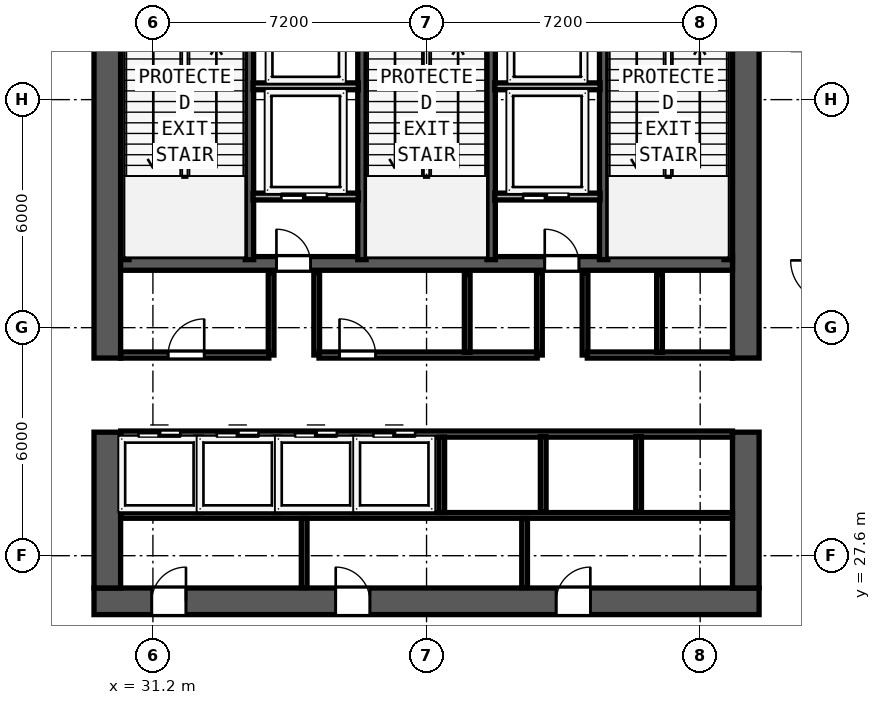
"""IFC4 building model, lengths in metres.
Left out: names, types, materials, properties, quantities, classifications, styles, units other than length and angle.
Written with IfcOpenShell. Run it as: python <this file> out.ifc"""

import sys

from ifc_helpers import new_model, si_unit, direction, frame, frame_2d, origin, place, context, subcontext, project, spatial, rectangle, extrude, element, fill, save


model = new_model("IFC4")
c1 = context("Model", 3, precision=1e-05, world=origin(), true_north=direction((0.0, 1.0)))
c2 = subcontext(c1, "Body", "Model", "MODEL_VIEW")
j1 = project(units=[si_unit("LENGTHUNIT", "METRE"), si_unit("PLANEANGLEUNIT", "RADIAN")], contexts=[c1])
p1 = place(None, origin())
s1 = spatial("IfcSite", under=j1, at=p1, CompositionType="ELEMENT")
p2 = place(p1, origin())
s2 = spatial("IfcBuilding", under=s1, at=p2, CompositionType="ELEMENT")
p3 = place(p2, frame((0.0, 0.0, 136.4)))
s3 = spatial("IfcBuildingStorey", under=s2, at=p3, CompositionType="ELEMENT", Elevation=136.4)
p4 = place(p3, frame((29.65, 26.4, 0.0), z_axis=(0.0, 0.0, 1.0), x_axis=(1.0, 0.0, 0.0)))
e1 = element("IfcWall", 1, at=p4, inside=s3, PredefinedType="SHEAR", context=c2, shape_type="SweptSolid", body=[
    extrude(rectangle(XDim=17.5, YDim=0.7, at=frame_2d((8.75, 0.0))), origin(), (0.0, 0.0, 1.0), 4.4),
])
p5 = place(p4, frame((2.42, 0.0, 0.0), z_axis=(0.0, 0.0, 1.0), x_axis=(-1.0, 0.0, 0.0)))
e2 = element("IfcOpeningElement", 2, at=p5, cuts=e1, PredefinedType="OPENING", context=c2, shape_type="SweptSolid", body=[
    extrude(rectangle(XDim=0.9, YDim=2.1, at=frame_2d((0.45, 1.05))), frame((0.0, 0.36, 0.0), z_axis=(0.0, -1.0, 0.0), x_axis=(1.0, 0.0, 0.0)), (0.0, 0.0, 1.0), 0.72),
])
p6 = place(p4, frame((7.26, 0.0, 0.0), z_axis=(0.0, 0.0, 1.0), x_axis=(-1.0, 0.0, 0.0)))
e3 = element("IfcOpeningElement", 3, at=p6, cuts=e1, PredefinedType="OPENING", context=c2, shape_type="SweptSolid", body=[
    extrude(rectangle(XDim=0.9, YDim=2.1, at=frame_2d((0.45, 1.05))), frame((0.0, 0.36, 0.0), z_axis=(0.0, -1.0, 0.0), x_axis=(1.0, 0.0, 0.0)), (0.0, 0.0, 1.0), 0.72),
])
p7 = place(p4, frame((13.06, 0.0, 0.0), z_axis=(0.0, 0.0, 1.0), x_axis=(-1.0, 0.0, 0.0)))
e4 = element("IfcOpeningElement", 4, at=p7, cuts=e1, PredefinedType="OPENING", context=c2, shape_type="SweptSolid", body=[
    extrude(rectangle(XDim=0.9, YDim=2.1, at=frame_2d((0.45, 1.05))), frame((0.0, 0.36, 0.0), z_axis=(0.0, -1.0, 0.0), x_axis=(1.0, 0.0, 0.0)), (0.0, 0.0, 1.0), 0.72),
])
p8 = place(p3, frame((30.0, 26.75, 0.0), z_axis=(0.0, 0.0, 1.0), x_axis=(0.0, 1.0, 0.0)))
e5 = element("IfcWall", 5, at=p8, inside=s3, PredefinedType="SHEAR", context=c2, shape_type="SweptSolid", body=[
    extrude(rectangle(XDim=4.1, YDim=0.7, at=frame_2d((2.05, 0.0))), origin(), (0.0, 0.0, 1.0), 4.4),
])
p9 = place(p3, frame((30.0, 32.8, 0.0), z_axis=(0.0, 0.0, 1.0), x_axis=(0.0, 1.0, 0.0)))
e6 = element("IfcWall", 6, at=p9, inside=s3, PredefinedType="SHEAR", context=c2, shape_type="SweptSolid", body=[
    extrude(rectangle(XDim=10.05, YDim=0.7, at=frame_2d((5.025, 0.0))), origin(), (0.0, 0.0, 1.0), 4.4),
])
p10 = place(p3, frame((46.8, 26.75, 0.0), z_axis=(0.0, 0.0, 1.0), x_axis=(0.0, 1.0, 0.0)))
e7 = element("IfcWall", 7, at=p10, inside=s3, PredefinedType="SHEAR", context=c2, shape_type="SweptSolid", body=[
    extrude(rectangle(XDim=4.1, YDim=0.7, at=frame_2d((2.05, 0.0))), origin(), (0.0, 0.0, 1.0), 4.4),
])
p11 = place(p3, frame((46.8, 32.8, 0.0), z_axis=(0.0, 0.0, 1.0), x_axis=(0.0, 1.0, 0.0)))
e8 = element("IfcWall", 8, at=p11, inside=s3, PredefinedType="SHEAR", context=c2, shape_type="SweptSolid", body=[
    extrude(rectangle(XDim=10.05, YDim=0.7, at=frame_2d((5.025, 0.0))), origin(), (0.0, 0.0, 1.0), 4.4),
])
p12 = place(p3, frame((30.35, 35.29, 0.0), z_axis=(0.0, 0.0, 1.0), x_axis=(1.0, 0.0, 0.0)))
e9 = element("IfcWall", 9, at=p12, inside=s3, PredefinedType="SHEAR", context=c2, shape_type="SweptSolid", body=[
    extrude(rectangle(XDim=16.1, YDim=0.36, at=frame_2d((8.05, 0.0))), origin(), (0.0, 0.0, 1.0), 4.4),
])
p13 = place(p12, frame((5.0, 0.0, 0.0), z_axis=(0.0, 0.0, 1.0), x_axis=(-1.0, 0.0, 0.0)))
e10 = element("IfcOpeningElement", 10, at=p13, cuts=e9, PredefinedType="OPENING", context=c2, shape_type="SweptSolid", body=[
    extrude(rectangle(XDim=0.9, YDim=2.1, at=frame_2d((0.45, 1.05))), frame((0.0, 0.19, 0.0), z_axis=(0.0, -1.0, 0.0), x_axis=(1.0, 0.0, 0.0)), (0.0, 0.0, 1.0), 0.38),
])
p14 = place(p12, frame((12.06, 0.0, 0.0), z_axis=(0.0, 0.0, 1.0), x_axis=(-1.0, 0.0, 0.0)))
e11 = element("IfcOpeningElement", 11, at=p14, cuts=e9, PredefinedType="OPENING", context=c2, shape_type="SweptSolid", body=[
    extrude(rectangle(XDim=0.9, YDim=2.1, at=frame_2d((0.45, 1.05))), frame((0.0, 0.19, 0.0), z_axis=(0.0, -1.0, 0.0), x_axis=(1.0, 0.0, 0.0)), (0.0, 0.0, 1.0), 0.38),
])
for number, where, z_axis, x_axis in (
    (12, (30.462, 35.39, 0.0), (0.0, 0.0, 1.0), (0.0, 1.0, 0.0)),
    (13, (33.74, 35.39, 0.0), (0.0, 0.0, 1.0), (0.0, 1.0, 0.0)),
    (14, (36.7, 35.39, 0.0), (0.0, 0.0, 1.0), (0.0, 1.0, 0.0)),
    (15, (40.1, 35.39, 0.0), (0.0, 0.0, 1.0), (0.0, 1.0, 0.0)),
    (16, (43.06, 35.39, 0.0), (0.0, 0.0, 1.0), (0.0, 1.0, 0.0)),
    (17, (46.338, 35.39, 0.0), (0.0, 0.0, 1.0), (0.0, 1.0, 0.0)),
):
    element("IfcWall", number, at=place(p3, frame(where, z_axis=z_axis, x_axis=x_axis)), inside=s3, PredefinedType="SHEAR", context=c2, shape_type="SweptSolid", body=[
        extrude(rectangle(XDim=7.46, YDim=0.22, at=frame_2d((3.73, 0.0))), origin(), (0.0, 0.0, 1.0), 4.4),
    ])
for number, where, z_axis, x_axis in (
    (18, (33.835, 39.95, 0.0), (0.0, 0.0, 1.0), (1.0, 0.0, 0.0)),
    (19, (40.195, 39.95, 0.0), (0.0, 0.0, 1.0), (1.0, 0.0, 0.0)),
):
    element("IfcWall", number, at=place(p3, frame(where, z_axis=z_axis, x_axis=x_axis)), inside=s3, PredefinedType="SOLIDWALL", context=c2, shape_type="SweptSolid", body=[
        extrude(rectangle(XDim=2.77, YDim=0.18, at=frame_2d((1.385, 0.0))), origin(), (0.0, 0.0, 1.0), 4.4),
    ])
p15 = place(p3, frame((33.835, 37.05, 0.0), z_axis=(0.0, 0.0, 1.0), x_axis=(1.0, 0.0, 0.0)))
e20 = element("IfcWall", 20, at=p15, inside=s3, PredefinedType="SOLIDWALL", context=c2, shape_type="SweptSolid", body=[
    extrude(rectangle(XDim=2.77, YDim=0.18, at=frame_2d((1.385, 0.0))), origin(), (0.0, 0.0, 1.0), 4.4),
])
p16 = place(p15, frame((1.945, 0.0, 0.0), z_axis=(0.0, 0.0, 1.0), x_axis=(-1.0, 0.0, 0.0)))
e21 = element("IfcOpeningElement", 21, at=p16, cuts=e20, PredefinedType="OPENING", context=c2, shape_type="SweptSolid", body=[
    extrude(rectangle(XDim=1.2, YDim=2.2, at=frame_2d((0.6, 1.1))), frame((0.0, 0.1, 0.0), z_axis=(0.0, -1.0, 0.0), x_axis=(1.0, 0.0, 0.0)), (0.0, 0.0, 1.0), 0.2),
])
for number, where, z_axis, x_axis in (
    (22, (34.31, 32.88, 0.0), (0.0, 0.0, 1.0), (0.0, 1.0, 0.0)),
    (23, (35.51, 32.88, 0.0), (0.0, 0.0, 1.0), (0.0, 1.0, 0.0)),
):
    element("IfcWall", number, at=place(p3, frame(where, z_axis=z_axis, x_axis=x_axis)), inside=s3, PredefinedType="SOLIDWALL", context=c2, shape_type="SweptSolid", body=[
        extrude(rectangle(XDim=2.17, YDim=0.15, at=frame_2d((1.085, 0.0))), origin(), (0.0, 0.0, 1.0), 4.4),
    ])
p17 = place(p3, frame((40.195, 37.05, 0.0), z_axis=(0.0, 0.0, 1.0), x_axis=(1.0, 0.0, 0.0)))
e24 = element("IfcWall", 24, at=p17, inside=s3, PredefinedType="SOLIDWALL", context=c2, shape_type="SweptSolid", body=[
    extrude(rectangle(XDim=2.77, YDim=0.18, at=frame_2d((1.385, 0.0))), origin(), (0.0, 0.0, 1.0), 4.4),
])
p18 = place(p17, frame((1.945, 0.0, 0.0), z_axis=(0.0, 0.0, 1.0), x_axis=(-1.0, 0.0, 0.0)))
e25 = element("IfcOpeningElement", 25, at=p18, cuts=e24, PredefinedType="OPENING", context=c2, shape_type="SweptSolid", body=[
    extrude(rectangle(XDim=1.2, YDim=2.2, at=frame_2d((0.6, 1.1))), frame((0.0, 0.1, 0.0), z_axis=(0.0, -1.0, 0.0), x_axis=(1.0, 0.0, 0.0)), (0.0, 0.0, 1.0), 0.2),
])
for number, where, z_axis, x_axis in (
    (26, (41.37, 32.88, 0.0), (0.0, 0.0, 1.0), (0.0, 1.0, 0.0)),
    (27, (42.57, 32.88, 0.0), (0.0, 0.0, 1.0), (0.0, 1.0, 0.0)),
):
    element("IfcWall", number, at=place(p3, frame(where, z_axis=z_axis, x_axis=x_axis)), inside=s3, PredefinedType="SOLIDWALL", context=c2, shape_type="SweptSolid", body=[
        extrude(rectangle(XDim=2.17, YDim=0.15, at=frame_2d((1.085, 0.0))), origin(), (0.0, 0.0, 1.0), 4.4),
    ])
p19 = place(p3, frame((30.35, 32.88, 0.0), z_axis=(0.0, 0.0, 1.0), x_axis=(1.0, 0.0, 0.0)))
e28 = element("IfcWall", 28, at=p19, inside=s3, PredefinedType="SOLIDWALL", context=c2, shape_type="SweptSolid", body=[
    extrude(rectangle(XDim=3.9, YDim=0.16, at=frame_2d((1.95, 0.0))), origin(), (0.0, 0.0, 1.0), 4.4),
])
p20 = place(p19, frame((2.2, 0.0, 0.0), z_axis=(0.0, 0.0, 1.0), x_axis=(-1.0, 0.0, 0.0)))
e29 = element("IfcOpeningElement", 29, at=p20, cuts=e28, PredefinedType="OPENING", context=c2, shape_type="SweptSolid", body=[
    extrude(rectangle(XDim=0.95, YDim=2.12, at=frame_2d((0.475, 1.06))), frame((0.0, 0.09, 0.0), z_axis=(0.0, -1.0, 0.0), x_axis=(1.0, 0.0, 0.0)), (0.0, 0.0, 1.0), 0.18),
])
p21 = place(p3, frame((35.57, 32.88, 0.0), z_axis=(0.0, 0.0, 1.0), x_axis=(1.0, 0.0, 0.0)))
e30 = element("IfcWall", 30, at=p21, inside=s3, PredefinedType="SOLIDWALL", context=c2, shape_type="SweptSolid", body=[
    extrude(rectangle(XDim=5.74, YDim=0.16, at=frame_2d((2.87, 0.0))), origin(), (0.0, 0.0, 1.0), 4.4),
])
p22 = place(p21, frame((1.49, 0.0, 0.0), z_axis=(0.0, 0.0, 1.0), x_axis=(-1.0, 0.0, 0.0)))
e31 = element("IfcOpeningElement", 31, at=p22, cuts=e30, PredefinedType="OPENING", context=c2, shape_type="SweptSolid", body=[
    extrude(rectangle(XDim=0.95, YDim=2.12, at=frame_2d((0.475, 1.06))), frame((0.0, 0.09, 0.0), z_axis=(0.0, -1.0, 0.0), x_axis=(1.0, 0.0, 0.0)), (0.0, 0.0, 1.0), 0.18),
])
p23 = place(p3, frame((42.63, 32.88, 0.0), z_axis=(0.0, 0.0, 1.0), x_axis=(1.0, 0.0, 0.0)))
e32 = element("IfcWall", 32, at=p23, inside=s3, PredefinedType="SOLIDWALL", context=c2, shape_type="SweptSolid", body=[
    extrude(rectangle(XDim=3.82, YDim=0.16, at=frame_2d((1.91, 0.0))), origin(), (0.0, 0.0, 1.0), 4.4),
])
for number, where, z_axis, x_axis in (
    (33, (39.47, 32.95, 0.0), (0.0, 0.0, 1.0), (0.0, 1.0, 0.0)),
    (34, (44.53, 32.95, 0.0), (0.0, 0.0, 1.0), (0.0, 1.0, 0.0)),
):
    element("IfcWall", number, at=place(p3, frame(where, z_axis=z_axis, x_axis=x_axis)), inside=s3, PredefinedType="SOLIDWALL", context=c2, shape_type="SweptSolid", body=[
        extrude(rectangle(XDim=2.05, YDim=0.15, at=frame_2d((1.025, 0.0))), origin(), (0.0, 0.0, 1.0), 4.4),
    ])
p24 = place(p3, frame((30.35, 30.8, 0.0), z_axis=(0.0, 0.0, 1.0), x_axis=(1.0, 0.0, 0.0)))
e35 = element("IfcWall", 35, at=p24, inside=s3, PredefinedType="SOLIDWALL", context=c2, shape_type="SweptSolid", body=[
    extrude(rectangle(XDim=16.1, YDim=0.16, at=frame_2d((8.05, 0.0))), origin(), (0.0, 0.0, 1.0), 4.4),
])
p25 = place(p24, frame((0.47, 0.0, 0.0)))
e36 = element("IfcOpeningElement", 36, at=p25, cuts=e35, PredefinedType="OPENING", context=c2, shape_type="SweptSolid", body=[
    extrude(rectangle(XDim=1.1, YDim=2.2, at=frame_2d((0.55, 1.1))), frame((0.0, 0.09, 0.0), z_axis=(0.0, -1.0, 0.0), x_axis=(1.0, 0.0, 0.0)), (0.0, 0.0, 1.0), 0.18),
])
p26 = place(p24, frame((2.53, 0.0, 0.0)))
e37 = element("IfcOpeningElement", 37, at=p26, cuts=e35, PredefinedType="OPENING", context=c2, shape_type="SweptSolid", body=[
    extrude(rectangle(XDim=1.1, YDim=2.2, at=frame_2d((0.55, 1.1))), frame((0.0, 0.09, 0.0), z_axis=(0.0, -1.0, 0.0), x_axis=(1.0, 0.0, 0.0)), (0.0, 0.0, 1.0), 0.18),
])
p27 = place(p24, frame((4.59, 0.0, 0.0)))
e38 = element("IfcOpeningElement", 38, at=p27, cuts=e35, PredefinedType="OPENING", context=c2, shape_type="SweptSolid", body=[
    extrude(rectangle(XDim=1.1, YDim=2.2, at=frame_2d((0.55, 1.1))), frame((0.0, 0.09, 0.0), z_axis=(0.0, -1.0, 0.0), x_axis=(1.0, 0.0, 0.0)), (0.0, 0.0, 1.0), 0.18),
])
p28 = place(p24, frame((6.65, 0.0, 0.0)))
e39 = element("IfcOpeningElement", 39, at=p28, cuts=e35, PredefinedType="OPENING", context=c2, shape_type="SweptSolid", body=[
    extrude(rectangle(XDim=1.1, YDim=2.2, at=frame_2d((0.55, 1.1))), frame((0.0, 0.09, 0.0), z_axis=(0.0, -1.0, 0.0), x_axis=(1.0, 0.0, 0.0)), (0.0, 0.0, 1.0), 0.18),
])
p29 = place(p3, frame((30.35, 28.66, 0.0), z_axis=(0.0, 0.0, 1.0), x_axis=(1.0, 0.0, 0.0)))
e40 = element("IfcWall", 40, at=p29, inside=s3, PredefinedType="PARTITIONING", context=c2, shape_type="SweptSolid", body=[
    extrude(rectangle(XDim=16.1, YDim=0.15, at=frame_2d((8.05, 0.0))), origin(), (0.0, 0.0, 1.0), 4.4),
])
for number, where, z_axis, x_axis in (
    (41, (32.4, 28.735, 0.0), (0.0, 0.0, 1.0), (0.0, 1.0, 0.0)),
    (42, (34.46, 28.735, 0.0), (0.0, 0.0, 1.0), (0.0, 1.0, 0.0)),
    (43, (36.52, 28.735, 0.0), (0.0, 0.0, 1.0), (0.0, 1.0, 0.0)),
    (44, (38.8, 28.735, 0.0), (0.0, 0.0, 1.0), (0.0, 1.0, 0.0)),
):
    element("IfcWall", number, at=place(p3, frame(where, z_axis=z_axis, x_axis=x_axis)), inside=s3, PredefinedType="SOLIDWALL", context=c2, shape_type="SweptSolid", body=[
        extrude(rectangle(XDim=1.985, YDim=0.15, at=frame_2d((0.992, 0.0))), origin(), (0.0, 0.0, 1.0), 4.4),
    ])
for number, where, z_axis, x_axis in (
    (45, (35.18, 26.76, 0.0), (0.0, 0.0, 1.0), (0.0, 1.0, 0.0)),
    (46, (40.98, 26.76, 0.0), (0.0, 0.0, 1.0), (0.0, 1.0, 0.0)),
):
    element("IfcWall", number, at=place(p3, frame(where, z_axis=z_axis, x_axis=x_axis)), inside=s3, PredefinedType="PARTITIONING", context=c2, shape_type="SweptSolid", body=[
        extrude(rectangle(XDim=1.82, YDim=0.15, at=frame_2d((0.91, 0.0))), origin(), (0.0, 0.0, 1.0), 4.4),
    ])
for number, where, z_axis, x_axis in (
    (47, (41.47, 28.75, 0.0), (0.0, 0.0, 1.0), (0.0, 1.0, 0.0)),
    (48, (43.98, 28.75, 0.0), (0.0, 0.0, 1.0), (0.0, 1.0, 0.0)),
):
    element("IfcWall", number, at=place(p3, frame(where, z_axis=z_axis, x_axis=x_axis)), inside=s3, PredefinedType="SOLIDWALL", context=c2, shape_type="SweptSolid", body=[
        extrude(rectangle(XDim=1.985, YDim=0.15, at=frame_2d((0.993, 0.0))), origin(), (0.0, 0.0, 1.0), 4.4),
    ])
p30 = place(p16, origin())
e49 = element("IfcDoor", 49, at=p30, inside=s3, OperationType="SLIDING_TO_RIGHT", PredefinedType="DOOR", context=c2, shape_type="SweptSolid", body=[
    extrude(rectangle(XDim=1.2, YDim=2.2, at=frame_2d((0.6, 1.1))), frame((0.0, 0.025, 0.0), z_axis=(0.0, -1.0, 0.0), x_axis=(1.0, 0.0, 0.0)), (0.0, 0.0, 1.0), 0.05),
])
fill(e21, e49)
p31 = place(p13, origin())
e50 = element("IfcDoor", 50, at=p31, inside=s3, OperationType="SINGLE_SWING_RIGHT", PredefinedType="DOOR", context=c2, shape_type="SweptSolid", body=[
    extrude(rectangle(XDim=0.9, YDim=2.1, at=frame_2d((0.45, 1.05))), frame((0.0, 0.025, 0.0), z_axis=(0.0, -1.0, 0.0), x_axis=(1.0, 0.0, 0.0)), (0.0, 0.0, 1.0), 0.05),
])
fill(e10, e50)
p32 = place(p18, origin())
e51 = element("IfcDoor", 51, at=p32, inside=s3, OperationType="SLIDING_TO_RIGHT", PredefinedType="DOOR", context=c2, shape_type="SweptSolid", body=[
    extrude(rectangle(XDim=1.2, YDim=2.2, at=frame_2d((0.6, 1.1))), frame((0.0, 0.025, 0.0), z_axis=(0.0, -1.0, 0.0), x_axis=(1.0, 0.0, 0.0)), (0.0, 0.0, 1.0), 0.05),
])
fill(e25, e51)
p33 = place(p14, origin())
e52 = element("IfcDoor", 52, at=p33, inside=s3, OperationType="SINGLE_SWING_RIGHT", PredefinedType="DOOR", context=c2, shape_type="SweptSolid", body=[
    extrude(rectangle(XDim=0.9, YDim=2.1, at=frame_2d((0.45, 1.05))), frame((0.0, 0.025, 0.0), z_axis=(0.0, -1.0, 0.0), x_axis=(1.0, 0.0, 0.0)), (0.0, 0.0, 1.0), 0.05),
])
fill(e11, e52)
p34 = place(p20, origin())
e53 = element("IfcDoor", 53, at=p34, inside=s3, OperationType="SINGLE_SWING_LEFT", PredefinedType="DOOR", context=c2, shape_type="SweptSolid", body=[
    extrude(rectangle(XDim=0.95, YDim=2.12, at=frame_2d((0.475, 1.06))), frame((0.0, 0.025, 0.0), z_axis=(0.0, -1.0, 0.0), x_axis=(1.0, 0.0, 0.0)), (0.0, 0.0, 1.0), 0.05),
])
fill(e29, e53)
p35 = place(p22, origin())
e54 = element("IfcDoor", 54, at=p35, inside=s3, OperationType="SINGLE_SWING_RIGHT", PredefinedType="DOOR", context=c2, shape_type="SweptSolid", body=[
    extrude(rectangle(XDim=0.95, YDim=2.12, at=frame_2d((0.475, 1.06))), frame((0.0, 0.025, 0.0), z_axis=(0.0, -1.0, 0.0), x_axis=(1.0, 0.0, 0.0)), (0.0, 0.0, 1.0), 0.05),
])
fill(e31, e54)
p36 = place(p25, origin())
e55 = element("IfcDoor", 55, at=p36, inside=s3, OperationType="SLIDING_TO_LEFT", PredefinedType="DOOR", context=c2, shape_type="SweptSolid", body=[
    extrude(rectangle(XDim=1.1, YDim=2.2, at=frame_2d((0.55, 1.1))), frame((0.0, 0.025, 0.0), z_axis=(0.0, -1.0, 0.0), x_axis=(1.0, 0.0, 0.0)), (0.0, 0.0, 1.0), 0.05),
])
fill(e36, e55)
p37 = place(p26, origin())
e56 = element("IfcDoor", 56, at=p37, inside=s3, OperationType="SLIDING_TO_LEFT", PredefinedType="DOOR", context=c2, shape_type="SweptSolid", body=[
    extrude(rectangle(XDim=1.1, YDim=2.2, at=frame_2d((0.55, 1.1))), frame((0.0, 0.025, 0.0), z_axis=(0.0, -1.0, 0.0), x_axis=(1.0, 0.0, 0.0)), (0.0, 0.0, 1.0), 0.05),
])
fill(e37, e56)
p38 = place(p27, origin())
e57 = element("IfcDoor", 57, at=p38, inside=s3, OperationType="SLIDING_TO_LEFT", PredefinedType="DOOR", context=c2, shape_type="SweptSolid", body=[
    extrude(rectangle(XDim=1.1, YDim=2.2, at=frame_2d((0.55, 1.1))), frame((0.0, 0.025, 0.0), z_axis=(0.0, -1.0, 0.0), x_axis=(1.0, 0.0, 0.0)), (0.0, 0.0, 1.0), 0.05),
])
fill(e38, e57)
p39 = place(p28, origin())
e58 = element("IfcDoor", 58, at=p39, inside=s3, OperationType="SLIDING_TO_LEFT", PredefinedType="DOOR", context=c2, shape_type="SweptSolid", body=[
    extrude(rectangle(XDim=1.1, YDim=2.2, at=frame_2d((0.55, 1.1))), frame((0.0, 0.025, 0.0), z_axis=(0.0, -1.0, 0.0), x_axis=(1.0, 0.0, 0.0)), (0.0, 0.0, 1.0), 0.05),
])
fill(e39, e58)
p40 = place(p5, origin())
e59 = element("IfcDoor", 59, at=p40, inside=s3, OperationType="SINGLE_SWING_LEFT", PredefinedType="DOOR", context=c2, shape_type="SweptSolid", body=[
    extrude(rectangle(XDim=0.9, YDim=2.1, at=frame_2d((0.45, 1.05))), frame((0.0, -0.195, 0.0), z_axis=(0.0, -1.0, 0.0), x_axis=(1.0, 0.0, 0.0)), (0.0, 0.0, 1.0), 0.05),
])
fill(e2, e59)
p41 = place(p6, origin())
e60 = element("IfcDoor", 60, at=p41, inside=s3, OperationType="SINGLE_SWING_RIGHT", PredefinedType="DOOR", context=c2, shape_type="SweptSolid", body=[
    extrude(rectangle(XDim=0.9, YDim=2.1, at=frame_2d((0.45, 1.05))), frame((0.0, -0.195, 0.0), z_axis=(0.0, -1.0, 0.0), x_axis=(1.0, 0.0, 0.0)), (0.0, 0.0, 1.0), 0.05),
])
fill(e3, e60)
p42 = place(p7, origin())
e61 = element("IfcDoor", 61, at=p42, inside=s3, OperationType="SINGLE_SWING_LEFT", PredefinedType="DOOR", context=c2, shape_type="SweptSolid", body=[
    extrude(rectangle(XDim=0.9, YDim=2.1, at=frame_2d((0.45, 1.05))), frame((0.0, -0.195, 0.0), z_axis=(0.0, -1.0, 0.0), x_axis=(1.0, 0.0, 0.0)), (0.0, 0.0, 1.0), 0.05),
])
fill(e4, e61)
save(model, sys.argv[1])
